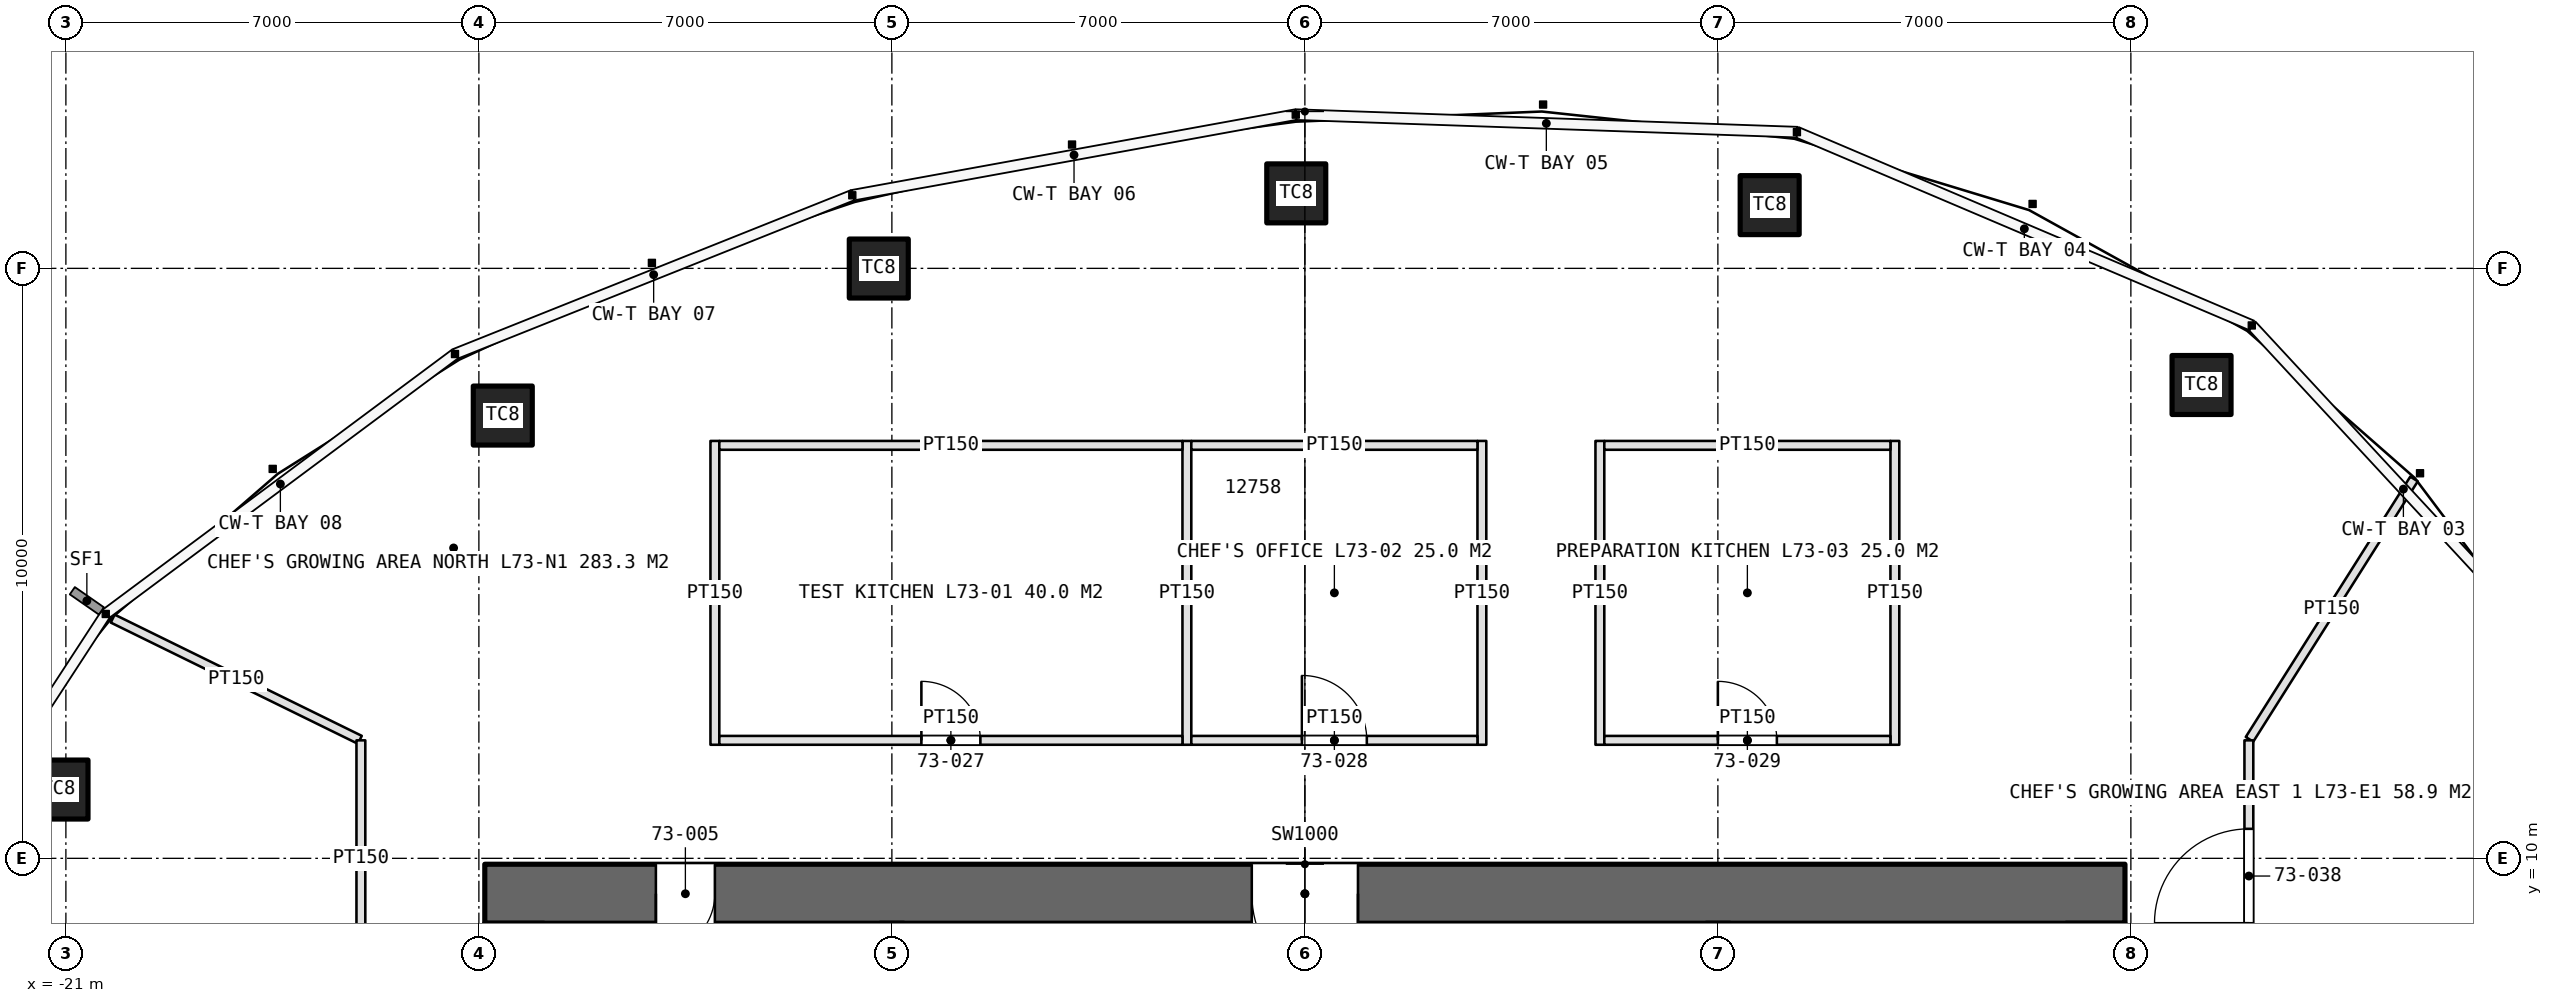
"""IFC4 building model, lengths in metres.
Left out: names, types, materials, properties, quantities, classifications, styles, units other than length and angle.
Written with IfcOpenShell. Run it as: python <this file> out.ifc"""

import sys

from ifc_helpers import new_model, si_unit, direction, frame, frame_2d, origin, origin_2d, place, context, subcontext, project, spatial, rectangle, extrude, element, fill, save


model = new_model("IFC4")
c1 = context("Model", 3, precision=1e-05, world=origin(), true_north=direction((0.0, 1.0)))
c2 = subcontext(c1, "Body", "Model", "MODEL_VIEW")
j1 = project(units=[si_unit("LENGTHUNIT", "METRE"), si_unit("PLANEANGLEUNIT", "RADIAN")], contexts=[c1])
p1 = place(None, origin())
s1 = spatial("IfcSite", under=j1, at=p1, CompositionType="ELEMENT")
p2 = place(p1, origin())
s2 = spatial("IfcBuilding", under=s1, at=p2, CompositionType="ELEMENT")
p3 = place(p2, frame((0.0, 0.0, 325.8)))
s3 = spatial("IfcBuildingStorey", under=s2, at=p3, CompositionType="ELEMENT", Elevation=325.8)
p4 = place(p3, frame((13.9, 9.4, 0.0), z_axis=(0.0, 0.0, 1.0), x_axis=(-1.0, 0.0, 0.0)))
e1 = element("IfcWall", 1, at=p4, inside=s3, PredefinedType="SHEAR", context=c2, shape_type="SweptSolid", body=[
    extrude(rectangle(XDim=27.8, YDim=1.0, at=frame_2d((13.9, 0.0))), origin(), (0.0, 0.0, 1.0), 4.2),
])
p5 = place(p4, frame((23.9, 0.0, 0.0)))
e2 = element("IfcOpeningElement", 2, at=p5, cuts=e1, PredefinedType="OPENING", context=c2, shape_type="SweptSolid", body=[
    extrude(rectangle(XDim=1.0, YDim=2.4, at=frame_2d((0.5, 1.2))), frame((0.0, 0.51, 0.0), z_axis=(0.0, -1.0, 0.0), x_axis=(1.0, 0.0, 0.0)), (0.0, 0.0, 1.0), 1.02),
])
p6 = place(p4, frame((13.0, 0.0, 0.0)))
e3 = element("IfcOpeningElement", 3, at=p6, cuts=e1, PredefinedType="OPENING", context=c2, shape_type="SweptSolid", body=[
    extrude(rectangle(XDim=1.8, YDim=2.4, at=frame_2d((0.9, 1.2))), frame((0.0, 0.51, 0.0), z_axis=(0.0, -1.0, 0.0), x_axis=(1.0, 0.0, 0.0)), (0.0, 0.0, 1.0), 1.02),
])
for number, where, z_axis, x_axis in (
    (4, (15.198, 18.023, 0.0), (0.0, 0.0, 1.0), (1.0, 0.0, 0.0)),
    (5, (7.878, 21.072, 0.0), (0.0, 0.0, 1.0), (1.0, 0.0, 0.0)),
    (6, (-0.146, 21.271, 0.0), (0.0, 0.0, 1.0), (1.0, 0.0, 0.0)),
    (7, (-7.222, 19.997, 0.0), (0.0, 0.0, 1.0), (1.0, 0.0, 0.0)),
    (8, (-13.595, 17.505, 0.0), (0.0, 0.0, 1.0), (1.0, 0.0, 0.0)),
    (9, (-21.125, 11.166, 0.0), (0.0, 0.0, 1.0), (1.0, 0.0, 0.0)),
):
    element("IfcColumn", number, at=place(p3, frame(where, z_axis=z_axis, x_axis=x_axis)), inside=s3, PredefinedType="COLUMN", context=c2, shape_type="SweptSolid", body=[
        extrude(rectangle(XDim=1.0, YDim=1.0, at=origin_2d()), origin(), (0.0, 0.0, 1.0), 4.2),
    ])
for number, where, z_axis, x_axis in (
    (10, (-10.0, 11.925, 0.0), (0.0, 0.0, 1.0), (0.0, 1.0, 0.0)),
    (11, (-2.0, 11.925, 0.0), (0.0, 0.0, 1.0), (0.0, 1.0, 0.0)),
    (12, (3.0, 11.925, 0.0), (0.0, 0.0, 1.0), (0.0, 1.0, 0.0)),
):
    element("IfcWall", number, at=place(p3, frame(where, z_axis=z_axis, x_axis=x_axis)), inside=s3, PredefinedType="PARTITIONING", context=c2, shape_type="SweptSolid", body=[
        extrude(rectangle(XDim=5.15, YDim=0.15, at=frame_2d((2.575, 0.0))), origin(), (0.0, 0.0, 1.0), 3.0),
    ])
p7 = place(p3, frame((-9.925, 12.0, 0.0), z_axis=(0.0, 0.0, 1.0), x_axis=(1.0, 0.0, 0.0)))
e13 = element("IfcWall", 13, at=p7, inside=s3, PredefinedType="PARTITIONING", context=c2, shape_type="SweptSolid", body=[
    extrude(rectangle(XDim=7.85, YDim=0.15, at=frame_2d((3.925, 0.0))), origin(), (0.0, 0.0, 1.0), 3.0),
])
p8 = place(p7, frame((3.425, 0.0, 0.0)))
e14 = element("IfcOpeningElement", 14, at=p8, cuts=e13, PredefinedType="OPENING", context=c2, shape_type="SweptSolid", body=[
    extrude(rectangle(XDim=1.0, YDim=2.2, at=frame_2d((0.5, 1.1))), frame((0.0, 0.085, 0.0), z_axis=(0.0, -1.0, 0.0), x_axis=(1.0, 0.0, 0.0)), (0.0, 0.0, 1.0), 0.17),
])
p9 = place(p3, frame((-9.925, 17.0, 0.0), z_axis=(0.0, 0.0, 1.0), x_axis=(1.0, 0.0, 0.0)))
e15 = element("IfcWall", 15, at=p9, inside=s3, PredefinedType="PARTITIONING", context=c2, shape_type="SweptSolid", body=[
    extrude(rectangle(XDim=7.85, YDim=0.15, at=frame_2d((3.925, 0.0))), origin(), (0.0, 0.0, 1.0), 3.0),
])
p10 = place(p3, frame((-1.925, 12.0, 0.0), z_axis=(0.0, 0.0, 1.0), x_axis=(1.0, 0.0, 0.0)))
e16 = element("IfcWall", 16, at=p10, inside=s3, PredefinedType="PARTITIONING", context=c2, shape_type="SweptSolid", body=[
    extrude(rectangle(XDim=4.85, YDim=0.15, at=frame_2d((2.425, 0.0))), origin(), (0.0, 0.0, 1.0), 3.0),
])
p11 = place(p10, frame((1.875, 0.0, 0.0)))
e17 = element("IfcOpeningElement", 17, at=p11, cuts=e16, PredefinedType="OPENING", context=c2, shape_type="SweptSolid", body=[
    extrude(rectangle(XDim=1.1, YDim=2.3, at=frame_2d((0.55, 1.15))), frame((0.0, 0.085, 0.0), z_axis=(0.0, -1.0, 0.0), x_axis=(1.0, 0.0, 0.0)), (0.0, 0.0, 1.0), 0.17),
])
p12 = place(p3, frame((-1.925, 17.0, 0.0), z_axis=(0.0, 0.0, 1.0), x_axis=(1.0, 0.0, 0.0)))
e18 = element("IfcWall", 18, at=p12, inside=s3, PredefinedType="PARTITIONING", context=c2, shape_type="SweptSolid", body=[
    extrude(rectangle(XDim=4.85, YDim=0.15, at=frame_2d((2.425, 0.0))), origin(), (0.0, 0.0, 1.0), 3.0),
])
for number, where, z_axis, x_axis in (
    (19, (5.0, 11.925, 0.0), (0.0, 0.0, 1.0), (0.0, 1.0, 0.0)),
    (20, (10.0, 11.925, 0.0), (0.0, 0.0, 1.0), (0.0, 1.0, 0.0)),
):
    element("IfcWall", number, at=place(p3, frame(where, z_axis=z_axis, x_axis=x_axis)), inside=s3, PredefinedType="PARTITIONING", context=c2, shape_type="SweptSolid", body=[
        extrude(rectangle(XDim=5.15, YDim=0.15, at=frame_2d((2.575, 0.0))), origin(), (0.0, 0.0, 1.0), 3.0),
    ])
p13 = place(p3, frame((5.075, 12.0, 0.0), z_axis=(0.0, 0.0, 1.0), x_axis=(1.0, 0.0, 0.0)))
e21 = element("IfcWall", 21, at=p13, inside=s3, PredefinedType="PARTITIONING", context=c2, shape_type="SweptSolid", body=[
    extrude(rectangle(XDim=4.85, YDim=0.15, at=frame_2d((2.425, 0.0))), origin(), (0.0, 0.0, 1.0), 3.0),
])
p14 = place(p13, frame((1.925, 0.0, 0.0)))
e22 = element("IfcOpeningElement", 22, at=p14, cuts=e21, PredefinedType="OPENING", context=c2, shape_type="SweptSolid", body=[
    extrude(rectangle(XDim=1.0, YDim=2.2, at=frame_2d((0.5, 1.1))), frame((0.0, 0.085, 0.0), z_axis=(0.0, -1.0, 0.0), x_axis=(1.0, 0.0, 0.0)), (0.0, 0.0, 1.0), 0.17),
])
p15 = place(p3, frame((5.075, 17.0, 0.0), z_axis=(0.0, 0.0, 1.0), x_axis=(1.0, 0.0, 0.0)))
e23 = element("IfcWall", 23, at=p15, inside=s3, PredefinedType="PARTITIONING", context=c2, shape_type="SweptSolid", body=[
    extrude(rectangle(XDim=4.85, YDim=0.15, at=frame_2d((2.425, 0.0))), origin(), (0.0, 0.0, 1.0), 3.0),
])
p16 = place(p3, frame((-16.018, 12.009, 0.0), z_axis=(0.0, 0.0, 1.0), x_axis=(-0.897771840996, 0.440460805879, 0.0)))
e24 = element("IfcWall", 24, at=p16, inside=s3, PredefinedType="PARTITIONING", context=c2, shape_type="SweptSolid", body=[
    extrude(rectangle(XDim=4.666, YDim=0.15, at=frame_2d((2.333, 0.0))), origin(), (0.0, 0.0, 1.0), 3.0),
])
p17 = place(p3, frame((16.011, 12.017, 0.0), z_axis=(0.0, 0.0, 1.0), x_axis=(0.53415837449, 0.845384427916, 0.0)))
e25 = element("IfcWall", 25, at=p17, inside=s3, PredefinedType="PARTITIONING", context=c2, shape_type="SweptSolid", body=[
    extrude(rectangle(XDim=5.22, YDim=0.15, at=frame_2d((2.61, 0.0))), origin(), (0.0, 0.0, 1.0), 3.0),
])
p18 = place(p3, frame((16.0, 4.0, 0.0), z_axis=(0.0, 0.0, 1.0), x_axis=(0.0, 1.0, 0.0)))
e26 = element("IfcWall", 26, at=p18, inside=s3, PredefinedType="PARTITIONING", context=c2, shape_type="SweptSolid", body=[
    extrude(rectangle(XDim=8.0, YDim=0.15, at=frame_2d((4.0, 0.0))), origin(), (0.0, 0.0, 1.0), 3.0),
])
p19 = place(p18, frame((4.9, 0.0, 0.0)))
e27 = element("IfcOpeningElement", 27, at=p19, cuts=e26, PredefinedType="OPENING", context=c2, shape_type="SweptSolid", body=[
    extrude(rectangle(XDim=1.6, YDim=2.4, at=frame_2d((0.8, 1.2))), frame((0.0, 0.085, 0.0), z_axis=(0.0, -1.0, 0.0), x_axis=(1.0, 0.0, 0.0)), (0.0, 0.0, 1.0), 0.17),
])
p20 = place(p3, frame((-16.0, 12.0, 0.0), z_axis=(0.0, 0.0, 1.0), x_axis=(0.0, -1.0, 0.0)))
e28 = element("IfcWall", 28, at=p20, inside=s3, PredefinedType="PARTITIONING", context=c2, shape_type="SweptSolid", body=[
    extrude(rectangle(XDim=4.0, YDim=0.15, at=frame_2d((2.0, 0.0))), origin(), (0.0, 0.0, 1.0), 3.0),
])
p21 = place(p5, origin())
e29 = element("IfcDoor", 29, at=p21, inside=s3, OperationType="SINGLE_SWING_RIGHT", PredefinedType="DOOR", context=c2, shape_type="SweptSolid", body=[
    extrude(rectangle(XDim=1.0, YDim=2.4, at=frame_2d((0.5, 1.2))), frame((0.0, 0.025, 0.0), z_axis=(0.0, -1.0, 0.0), x_axis=(1.0, 0.0, 0.0)), (0.0, 0.0, 1.0), 0.05),
])
fill(e2, e29)
p22 = place(p6, origin())
e30 = element("IfcDoor", 30, at=p22, inside=s3, OperationType="DOUBLE_DOOR_SINGLE_SWING", PredefinedType="DOOR", context=c2, shape_type="SweptSolid", body=[
    extrude(rectangle(XDim=1.8, YDim=2.4, at=frame_2d((0.9, 1.2))), frame((0.0, 0.025, 0.0), z_axis=(0.0, -1.0, 0.0), x_axis=(1.0, 0.0, 0.0)), (0.0, 0.0, 1.0), 0.05),
])
fill(e3, e30)
p23 = place(p8, origin())
e31 = element("IfcDoor", 31, at=p23, inside=s3, OperationType="SINGLE_SWING_LEFT", PredefinedType="DOOR", context=c2, shape_type="SweptSolid", body=[
    extrude(rectangle(XDim=1.0, YDim=2.2, at=frame_2d((0.5, 1.1))), frame((0.0, 0.025, 0.0), z_axis=(0.0, -1.0, 0.0), x_axis=(1.0, 0.0, 0.0)), (0.0, 0.0, 1.0), 0.05),
])
fill(e14, e31)
p24 = place(p11, origin())
e32 = element("IfcDoor", 32, at=p24, inside=s3, OperationType="SINGLE_SWING_LEFT", PredefinedType="DOOR", context=c2, shape_type="SweptSolid", body=[
    extrude(rectangle(XDim=1.1, YDim=2.3, at=frame_2d((0.55, 1.15))), frame((0.0, 0.025, 0.0), z_axis=(0.0, -1.0, 0.0), x_axis=(1.0, 0.0, 0.0)), (0.0, 0.0, 1.0), 0.05),
])
fill(e17, e32)
p25 = place(p14, origin())
e33 = element("IfcDoor", 33, at=p25, inside=s3, OperationType="SINGLE_SWING_LEFT", PredefinedType="DOOR", context=c2, shape_type="SweptSolid", body=[
    extrude(rectangle(XDim=1.0, YDim=2.2, at=frame_2d((0.5, 1.1))), frame((0.0, 0.025, 0.0), z_axis=(0.0, -1.0, 0.0), x_axis=(1.0, 0.0, 0.0)), (0.0, 0.0, 1.0), 0.05),
])
fill(e22, e33)
p26 = place(p19, origin())
e34 = element("IfcDoor", 34, at=p26, inside=s3, OperationType="DOUBLE_DOOR_SINGLE_SWING", PredefinedType="DOOR", context=c2, shape_type="SweptSolid", body=[
    extrude(rectangle(XDim=1.6, YDim=2.4, at=frame_2d((0.8, 1.2))), frame((0.0, 0.025, 0.0), z_axis=(0.0, -1.0, 0.0), x_axis=(1.0, 0.0, 0.0)), (0.0, 0.0, 1.0), 0.05),
])
fill(e27, e34)
save(model, sys.argv[1])
